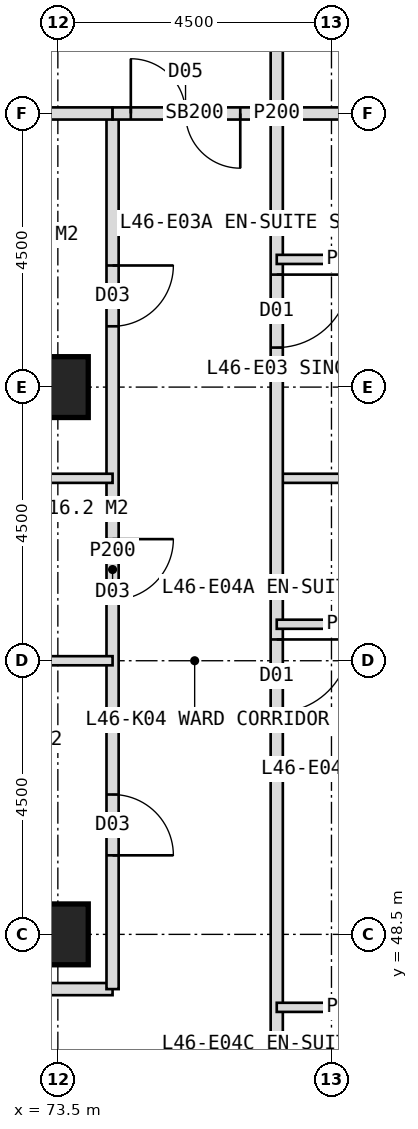
"""IFC4 building model, lengths in metres.
Left out: names, types, materials, properties, quantities, classifications, styles, units other than length and angle.
Written with IfcOpenShell. Run it as: python <this file> out.ifc"""

import sys

from ifc_helpers import new_model, si_unit, direction, frame, frame_2d, origin, origin_2d, place, context, subcontext, project, spatial, rectangle, hollow_rectangle, extrude, element, fill, save


model = new_model("IFC4")
c1 = context("Model", 3, precision=1e-05, world=origin(), true_north=direction((0.0, 1.0)))
c2 = subcontext(c1, "Body", "Model", "MODEL_VIEW")
j1 = project(units=[si_unit("LENGTHUNIT", "METRE"), si_unit("PLANEANGLEUNIT", "RADIAN")], contexts=[c1])
p1 = place(None, origin())
s1 = spatial("IfcSite", under=j1, at=p1, CompositionType="ELEMENT")
p2 = place(p1, origin())
s2 = spatial("IfcBuilding", under=s1, at=p2, CompositionType="ELEMENT")
p3 = place(p2, frame((0.0, 0.0, 193.0)))
s3 = spatial("IfcBuildingStorey", under=s2, at=p3, CompositionType="ELEMENT", Elevation=193.0)
for number, where, z_axis, x_axis in (
    (1, (73.5, 48.5, 0.0), (0.0, 0.0, 1.0), (1.0, 0.0, 0.0)),
    (2, (73.5, 57.5, 0.0), (0.0, 0.0, 1.0), (1.0, 0.0, 0.0)),
):
    element("IfcColumn", number, at=place(p3, frame(where, z_axis=z_axis, x_axis=x_axis)), inside=s3, PredefinedType="COLUMN", context=c2, shape_type="SweptSolid", body=[
        extrude(hollow_rectangle(XDim=1.0, YDim=1.0, WallThickness=0.1, at=origin_2d()), origin(), (0.0, 0.0, 1.0), 4.0),
    ])
p4 = place(p3, frame((74.4, 47.6, 0.0), z_axis=(0.0, 0.0, 1.0), x_axis=(-1.0, 0.0, 0.0)))
e3 = element("IfcWall", 3, at=p4, inside=s3, PredefinedType="PARTITIONING", context=c2, shape_type="SweptSolid", body=[
    extrude(rectangle(XDim=5.4, YDim=0.2, at=frame_2d((2.7, 0.0))), origin(), (0.0, 0.0, 1.0), 3.75),
])
p5 = place(p3, frame((77.1, 62.0, 0.0), z_axis=(0.0, 0.0, 1.0), x_axis=(1.0, 0.0, 0.0)))
e4 = element("IfcWall", 4, at=p5, inside=s3, PredefinedType="SOLIDWALL", context=c2, shape_type="SweptSolid", body=[
    extrude(rectangle(XDim=5.25, YDim=0.2, at=frame_2d((2.625, 0.0))), origin(), (0.0, 0.0, 1.0), 2.95),
])
p6 = place(p3, frame((77.1, 56.0, 0.0), z_axis=(0.0, 0.0, 1.0), x_axis=(1.0, 0.0, 0.0)))
e5 = element("IfcWall", 5, at=p6, inside=s3, PredefinedType="PARTITIONING", context=c2, shape_type="SweptSolid", body=[
    extrude(rectangle(XDim=5.25, YDim=0.15, at=frame_2d((2.625, 0.0))), origin(), (0.0, 0.0, 1.0), 3.75),
])
p7 = place(p3, frame((77.1, 79.1, 0.0), z_axis=(0.0, 0.0, 1.0), x_axis=(0.0, -1.0, 0.0)))
e6 = element("IfcWall", 6, at=p7, inside=s3, PredefinedType="PARTITIONING", context=c2, shape_type="SweptSolid", body=[
    extrude(rectangle(XDim=34.2, YDim=0.2, at=frame_2d((17.1, 0.0))), origin(), (0.0, 0.0, 1.0), 3.75),
])
p8 = place(p7, frame((3.25, 0.0, 0.0)))
e7 = element("IfcOpeningElement", 7, at=p8, cuts=e6, PredefinedType="OPENING", context=c2, shape_type="SweptSolid", body=[
    extrude(rectangle(XDim=1.2, YDim=2.2, at=frame_2d((0.6, 1.1))), frame((0.0, 0.11, 0.0), z_axis=(0.0, -1.0, 0.0), x_axis=(1.0, 0.0, 0.0)), (0.0, 0.0, 1.0), 0.22),
])
p9 = place(p7, frame((11.35, 0.0, 0.0)))
e8 = element("IfcOpeningElement", 8, at=p9, cuts=e6, PredefinedType="OPENING", context=c2, shape_type="SweptSolid", body=[
    extrude(rectangle(XDim=1.2, YDim=2.2, at=frame_2d((0.6, 1.1))), frame((0.0, 0.11, 0.0), z_axis=(0.0, -1.0, 0.0), x_axis=(1.0, 0.0, 0.0)), (0.0, 0.0, 1.0), 0.22),
])
p10 = place(p7, frame((19.75, 0.0, 0.0)))
e9 = element("IfcOpeningElement", 9, at=p10, cuts=e6, PredefinedType="OPENING", context=c2, shape_type="SweptSolid", body=[
    extrude(rectangle(XDim=1.2, YDim=2.2, at=frame_2d((0.6, 1.1))), frame((0.0, 0.11, 0.0), z_axis=(0.0, -1.0, 0.0), x_axis=(1.0, 0.0, 0.0)), (0.0, 0.0, 1.0), 0.22),
])
p11 = place(p7, frame((25.75, 0.0, 0.0)))
e10 = element("IfcOpeningElement", 10, at=p11, cuts=e6, PredefinedType="OPENING", context=c2, shape_type="SweptSolid", body=[
    extrude(rectangle(XDim=1.2, YDim=2.2, at=frame_2d((0.6, 1.1))), frame((0.0, 0.11, 0.0), z_axis=(0.0, -1.0, 0.0), x_axis=(1.0, 0.0, 0.0)), (0.0, 0.0, 1.0), 0.22),
])
for number, where, z_axis, x_axis in (
    (11, (77.1, 59.6, 0.0), (0.0, 0.0, 1.0), (1.0, 0.0, 0.0)),
    (12, (77.1, 53.6, 0.0), (0.0, 0.0, 1.0), (1.0, 0.0, 0.0)),
    (13, (77.1, 47.3, 0.0), (0.0, 0.0, 1.0), (1.0, 0.0, 0.0)),
):
    element("IfcWall", number, at=place(p3, frame(where, z_axis=z_axis, x_axis=x_axis)), inside=s3, PredefinedType="PARTITIONING", context=c2, shape_type="SweptSolid", body=[
        extrude(rectangle(XDim=2.4, YDim=0.15, at=frame_2d((1.2, 0.0))), origin(), (0.0, 0.0, 1.0), 3.75),
    ])
p12 = place(p3, frame((74.4, 62.0, 0.0), z_axis=(0.0, 0.0, 1.0), x_axis=(0.0, -1.0, 0.0)))
e14 = element("IfcWall", 14, at=p12, inside=s3, PredefinedType="PARTITIONING", context=c2, shape_type="SweptSolid", body=[
    extrude(rectangle(XDim=14.4, YDim=0.2, at=frame_2d((7.2, 0.0))), origin(), (0.0, 0.0, 1.0), 3.75),
])
p13 = place(p12, frame((2.5, 0.0, 0.0)))
e15 = element("IfcOpeningElement", 15, at=p13, cuts=e14, PredefinedType="OPENING", context=c2, shape_type="SweptSolid", body=[
    extrude(rectangle(XDim=1.0, YDim=2.1, at=frame_2d((0.5, 1.05))), frame((0.0, 0.11, 0.0), z_axis=(0.0, -1.0, 0.0), x_axis=(1.0, 0.0, 0.0)), (0.0, 0.0, 1.0), 0.22),
])
p14 = place(p12, frame((7.0, 0.0, 0.0)))
e16 = element("IfcOpeningElement", 16, at=p14, cuts=e14, PredefinedType="OPENING", context=c2, shape_type="SweptSolid", body=[
    extrude(rectangle(XDim=1.0, YDim=2.1, at=frame_2d((0.5, 1.05))), frame((0.0, 0.11, 0.0), z_axis=(0.0, -1.0, 0.0), x_axis=(1.0, 0.0, 0.0)), (0.0, 0.0, 1.0), 0.22),
])
p15 = place(p12, frame((11.2, 0.0, 0.0)))
e17 = element("IfcOpeningElement", 17, at=p15, cuts=e14, PredefinedType="OPENING", context=c2, shape_type="SweptSolid", body=[
    extrude(rectangle(XDim=1.0, YDim=2.1, at=frame_2d((0.5, 1.05))), frame((0.0, 0.11, 0.0), z_axis=(0.0, -1.0, 0.0), x_axis=(1.0, 0.0, 0.0)), (0.0, 0.0, 1.0), 0.22),
])
p16 = place(p3, frame((69.0, 62.0, 0.0), z_axis=(0.0, 0.0, 1.0), x_axis=(1.0, 0.0, 0.0)))
e18 = element("IfcWall", 18, at=p16, inside=s3, PredefinedType="SOLIDWALL", context=c2, shape_type="SweptSolid", body=[
    extrude(rectangle(XDim=5.4, YDim=0.2, at=frame_2d((2.7, 0.0))), origin(), (0.0, 0.0, 1.0), 2.95),
])
for number, where, z_axis, x_axis in (
    (19, (69.0, 56.0, 0.0), (0.0, 0.0, 1.0), (1.0, 0.0, 0.0)),
    (20, (69.0, 53.0, 0.0), (0.0, 0.0, 1.0), (1.0, 0.0, 0.0)),
):
    element("IfcWall", number, at=place(p3, frame(where, z_axis=z_axis, x_axis=x_axis)), inside=s3, PredefinedType="PARTITIONING", context=c2, shape_type="SweptSolid", body=[
        extrude(rectangle(XDim=5.4, YDim=0.15, at=frame_2d((2.7, 0.0))), origin(), (0.0, 0.0, 1.0), 3.75),
    ])
p17 = place(p3, frame((74.4, 62.0, 0.0), z_axis=(0.0, 0.0, 1.0), x_axis=(1.0, 0.0, 0.0)))
e21 = element("IfcWall", 21, at=p17, inside=s3, PredefinedType="SOLIDWALL", context=c2, shape_type="SweptSolid", body=[
    extrude(rectangle(XDim=2.7, YDim=0.2, at=frame_2d((1.35, 0.0))), origin(), (0.0, 0.0, 1.0), 2.95),
])
p18 = place(p17, frame((0.3, 0.0, 0.0)))
e22 = element("IfcOpeningElement", 22, at=p18, cuts=e21, PredefinedType="OPENING", context=c2, shape_type="SweptSolid", body=[
    extrude(rectangle(XDim=1.8, YDim=2.2, at=frame_2d((0.9, 1.1))), frame((0.0, 0.11, 0.0), z_axis=(0.0, -1.0, 0.0), x_axis=(1.0, 0.0, 0.0)), (0.0, 0.0, 1.0), 0.22),
])
p19 = place(p10, origin())
e23 = element("IfcDoor", 23, at=p19, inside=s3, OperationType="SINGLE_SWING_LEFT", PredefinedType="DOOR", context=c2, shape_type="SweptSolid", body=[
    extrude(rectangle(XDim=1.2, YDim=2.2, at=frame_2d((0.6, 1.1))), frame((0.0, 0.025, 0.0), z_axis=(0.0, -1.0, 0.0), x_axis=(1.0, 0.0, 0.0)), (0.0, 0.0, 1.0), 0.05),
])
fill(e9, e23)
p20 = place(p11, origin())
e24 = element("IfcDoor", 24, at=p20, inside=s3, OperationType="SINGLE_SWING_LEFT", PredefinedType="DOOR", context=c2, shape_type="SweptSolid", body=[
    extrude(rectangle(XDim=1.2, YDim=2.2, at=frame_2d((0.6, 1.1))), frame((0.0, 0.025, 0.0), z_axis=(0.0, -1.0, 0.0), x_axis=(1.0, 0.0, 0.0)), (0.0, 0.0, 1.0), 0.05),
])
fill(e10, e24)
p21 = place(p13, origin())
e25 = element("IfcDoor", 25, at=p21, inside=s3, OperationType="SINGLE_SWING_LEFT", PredefinedType="DOOR", context=c2, shape_type="SweptSolid", body=[
    extrude(rectangle(XDim=1.0, YDim=2.1, at=frame_2d((0.5, 1.05))), frame((0.0, 0.025, 0.0), z_axis=(0.0, -1.0, 0.0), x_axis=(1.0, 0.0, 0.0)), (0.0, 0.0, 1.0), 0.05),
])
fill(e15, e25)
p22 = place(p14, origin())
e26 = element("IfcDoor", 26, at=p22, inside=s3, OperationType="SINGLE_SWING_LEFT", PredefinedType="DOOR", context=c2, shape_type="SweptSolid", body=[
    extrude(rectangle(XDim=1.0, YDim=2.1, at=frame_2d((0.5, 1.05))), frame((0.0, 0.025, 0.0), z_axis=(0.0, -1.0, 0.0), x_axis=(1.0, 0.0, 0.0)), (0.0, 0.0, 1.0), 0.05),
])
fill(e16, e26)
p23 = place(p15, origin())
e27 = element("IfcDoor", 27, at=p23, inside=s3, OperationType="SINGLE_SWING_RIGHT", PredefinedType="DOOR", context=c2, shape_type="SweptSolid", body=[
    extrude(rectangle(XDim=1.0, YDim=2.1, at=frame_2d((0.5, 1.05))), frame((0.0, 0.025, 0.0), z_axis=(0.0, -1.0, 0.0), x_axis=(1.0, 0.0, 0.0)), (0.0, 0.0, 1.0), 0.05),
])
fill(e17, e27)
p24 = place(p18, origin())
e28 = element("IfcDoor", 28, at=p24, inside=s3, OperationType="DOUBLE_DOOR_DOUBLE_SWING", PredefinedType="DOOR", context=c2, shape_type="SweptSolid", body=[
    extrude(rectangle(XDim=1.8, YDim=2.2, at=frame_2d((0.9, 1.1))), frame((0.0, 0.025, 0.0), z_axis=(0.0, -1.0, 0.0), x_axis=(1.0, 0.0, 0.0)), (0.0, 0.0, 1.0), 0.05),
])
fill(e22, e28)
save(model, sys.argv[1])
